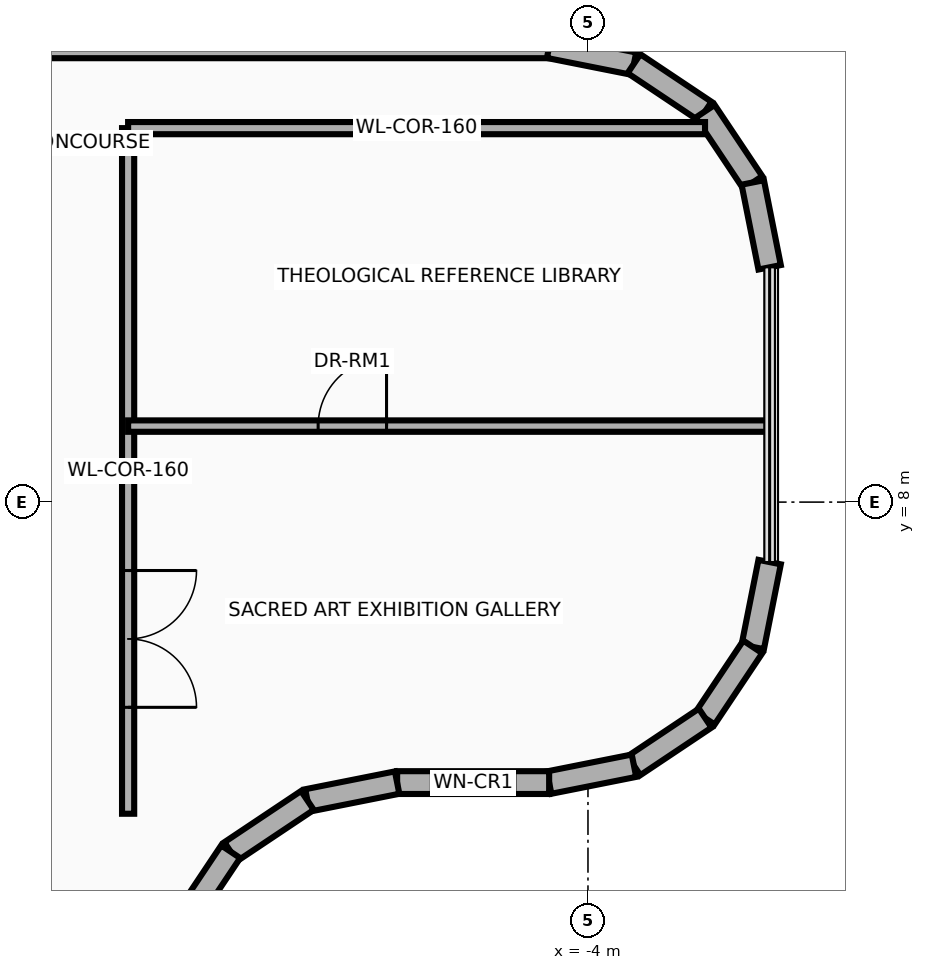
"""IFC4 building model, lengths in metres.
Left out: names, types, materials, properties, quantities, classifications, styles, units other than length and angle.
Written with IfcOpenShell. Run it as: python <this file> out.ifc"""

import sys

from ifc_helpers import new_model, si_unit, direction, frame, frame_2d, origin, place, context, subcontext, project, spatial, rectangle, extrude, element, fill, save


model = new_model("IFC4")
c1 = context("Model", 3, precision=1e-05, world=origin(), true_north=direction((0.0, 1.0)))
c2 = subcontext(c1, "Body", "Model", "MODEL_VIEW")
j1 = project(units=[si_unit("LENGTHUNIT", "METRE"), si_unit("PLANEANGLEUNIT", "RADIAN")], contexts=[c1])
p1 = place(None, origin())
s1 = spatial("IfcSite", under=j1, at=p1, CompositionType="ELEMENT")
p2 = place(p1, origin())
s2 = spatial("IfcBuilding", under=s1, at=p2, CompositionType="ELEMENT")
p3 = place(p2, frame((0.0, 0.0, 290.6)))
s3 = spatial("IfcBuildingStorey", under=s2, at=p3, CompositionType="ELEMENT", Elevation=290.6)
p4 = place(p3, frame((-26.989, 13.99, 0.0), z_axis=(0.0, 0.0, 1.0), x_axis=(1.0, 0.0, 0.0)))
e1 = element("IfcWall", 1, at=p4, inside=s3, PredefinedType="SOLIDWALL", context=c2, shape_type="SweptSolid", body=[
    extrude(rectangle(XDim=22.479, YDim=0.3, at=frame_2d((11.239, 0.0))), origin(), (0.0, 0.0, 1.0), 2.734),
])
p5 = place(p4, frame((10.79, 0.0, 0.0)))
e2 = element("IfcOpeningElement", 2, at=p5, cuts=e1, PredefinedType="OPENING", context=c2, shape_type="SweptSolid", body=[
    extrude(rectangle(XDim=1.2, YDim=2.15, at=frame_2d((0.6, 1.075))), frame((0.0, 0.165, 0.0), z_axis=(0.0, -1.0, 0.0), x_axis=(1.0, 0.0, 0.0)), (0.0, 0.0, 1.0), 0.33),
])
p6 = place(p3, frame((-4.511, 13.99, 0.0), z_axis=(0.0, 0.0, 1.0), x_axis=(0.980794657743, -0.195043173023, 0.0)))
e3 = element("IfcWall", 3, at=p6, inside=s3, PredefinedType="SOLIDWALL", context=c2, shape_type="SweptSolid", body=[
    extrude(rectangle(XDim=1.138, YDim=0.3, at=frame_2d((0.569, 0.0))), origin(), (0.0, 0.0, 1.0), 3.36),
])
p7 = place(p3, frame((-3.395, 13.768, 0.0), z_axis=(0.0, 0.0, 1.0), x_axis=(0.831449735491, -0.555599979619, 0.0)))
e4 = element("IfcWall", 4, at=p7, inside=s3, PredefinedType="SOLIDWALL", context=c2, shape_type="SweptSolid", body=[
    extrude(rectangle(XDim=1.127, YDim=0.3, at=frame_2d((0.563, 0.0))), origin(), (0.0, 0.0, 1.0), 3.36),
])
p8 = place(p3, frame((-2.458, 13.142, 0.0), z_axis=(0.0, 0.0, 1.0), x_axis=(0.555499891703, -0.831516608564, 0.0)))
e5 = element("IfcWall", 5, at=p8, inside=s3, PredefinedType="SOLIDWALL", context=c2, shape_type="SweptSolid", body=[
    extrude(rectangle(XDim=1.127, YDim=0.3, at=frame_2d((0.563, 0.0))), origin(), (0.0, 0.0, 1.0), 3.36),
])
for number, where, z_axis, x_axis in (
    (6, (-1.832, 12.205, 0.0), (0.0, 0.0, 1.0), (0.195, -0.981, 0.0)),
    (7, (-1.61, 7.211, 0.0), (0.0, 0.0, 1.0), (-0.195, -0.981, 0.0)),
):
    element("IfcWall", number, at=place(p3, frame(where, z_axis=z_axis, x_axis=x_axis)), inside=s3, PredefinedType="SOLIDWALL", context=c2, shape_type="SweptSolid", body=[
        extrude(rectangle(XDim=1.138, YDim=0.3, at=frame_2d((0.569, 0.0))), origin(), (0.0, 0.0, 1.0), 3.36),
    ])
for number, where, z_axis, x_axis in (
    (8, (-1.832, 6.095, 0.0), (0.0, 0.0, 1.0), (-0.556, -0.831, 0.0)),
    (9, (-2.458, 5.158, 0.0), (0.0, 0.0, 1.0), (-0.831, -0.556, 0.0)),
):
    element("IfcWall", number, at=place(p3, frame(where, z_axis=z_axis, x_axis=x_axis)), inside=s3, PredefinedType="SOLIDWALL", context=c2, shape_type="SweptSolid", body=[
        extrude(rectangle(XDim=1.127, YDim=0.3, at=frame_2d((0.563, 0.0))), origin(), (0.0, 0.0, 1.0), 3.36),
    ])
p9 = place(p3, frame((-3.395, 4.532, 0.0), z_axis=(0.0, 0.0, 1.0), x_axis=(-0.980794657743, -0.195043173023, 0.0)))
e10 = element("IfcWall", 10, at=p9, inside=s3, PredefinedType="SOLIDWALL", context=c2, shape_type="SweptSolid", body=[
    extrude(rectangle(XDim=1.138, YDim=0.3, at=frame_2d((0.569, 0.0))), origin(), (0.0, 0.0, 1.0), 3.36),
])
p10 = place(p3, frame((-4.511, 4.31, 0.0), z_axis=(0.0, 0.0, 1.0), x_axis=(-1.0, 0.0, 0.0)))
e11 = element("IfcWall", 11, at=p10, inside=s3, PredefinedType="SOLIDWALL", context=c2, shape_type="SweptSolid", body=[
    extrude(rectangle(XDim=2.0, YDim=0.3, at=frame_2d((1.0, 0.0))), origin(), (0.0, 0.0, 1.0), 3.36),
])
p11 = place(p10, frame((0.45, 0.0, 0.9)))
e12 = element("IfcOpeningElement", 12, at=p11, cuts=e11, PredefinedType="OPENING", context=c2, shape_type="SweptSolid", body=[
    extrude(rectangle(XDim=1.1, YDim=1.55, at=frame_2d((0.55, 0.775))), frame((0.0, 0.165, 0.0), z_axis=(0.0, -1.0, 0.0), x_axis=(1.0, 0.0, 0.0)), (0.0, 0.0, 1.0), 0.33),
])
p12 = place(p3, frame((-6.511, 4.31, 0.0), z_axis=(0.0, 0.0, 1.0), x_axis=(-0.980767511126, -0.195179632955, 0.0)))
e13 = element("IfcWall", 13, at=p12, inside=s3, PredefinedType="SOLIDWALL", context=c2, shape_type="SweptSolid", body=[
    extrude(rectangle(XDim=1.203, YDim=0.3, at=frame_2d((0.602, 0.0))), origin(), (0.0, 0.0, 1.0), 3.36),
])
p13 = place(p3, frame((-7.691, 4.075, 0.0), z_axis=(0.0, 0.0, 1.0), x_axis=(-0.83152410926, -0.555488663899, 0.0)))
e14 = element("IfcWall", 14, at=p13, inside=s3, PredefinedType="SOLIDWALL", context=c2, shape_type="SweptSolid", body=[
    extrude(rectangle(XDim=1.214, YDim=0.3, at=frame_2d((0.607, 0.0))), origin(), (0.0, 0.0, 1.0), 3.36),
])
p14 = place(p3, frame((-8.701, 3.401, 0.0), z_axis=(0.0, 0.0, 1.0), x_axis=(-0.555581539313, -0.831462057568, 0.0)))
e15 = element("IfcWall", 15, at=p14, inside=s3, PredefinedType="SOLIDWALL", context=c2, shape_type="SweptSolid", body=[
    extrude(rectangle(XDim=1.214, YDim=0.3, at=frame_2d((0.607, 0.0))), origin(), (0.0, 0.0, 1.0), 3.36),
])
p15 = place(p3, frame((-10.05, 3.9, 0.0), z_axis=(0.0, 0.0, 1.0), x_axis=(0.0, 1.0, 0.0)))
e16 = element("IfcWall", 16, at=p15, inside=s3, PredefinedType="PARTITIONING", context=c2, shape_type="SweptSolid", body=[
    extrude(rectangle(XDim=9.02, YDim=0.16, at=frame_2d((4.51, 0.0))), origin(), (0.0, 0.0, 1.0), 3.36),
])
p16 = place(p15, frame((1.4, 0.0, 0.0)))
e17 = element("IfcOpeningElement", 17, at=p16, cuts=e16, PredefinedType="OPENING", context=c2, shape_type="SweptSolid", body=[
    extrude(rectangle(XDim=1.8, YDim=2.15, at=frame_2d((0.9, 1.075))), frame((0.0, 0.095, 0.0), z_axis=(0.0, -1.0, 0.0), x_axis=(1.0, 0.0, 0.0)), (0.0, 0.0, 1.0), 0.19),
])
p17 = place(p3, frame((-10.05, 12.92, 0.0), z_axis=(0.0, 0.0, 1.0), x_axis=(1.0, 0.0, 0.0)))
e18 = element("IfcWall", 18, at=p17, inside=s3, PredefinedType="PARTITIONING", context=c2, shape_type="SweptSolid", body=[
    extrude(rectangle(XDim=7.59, YDim=0.16, at=frame_2d((3.795, 0.0))), origin(), (0.0, 0.0, 1.0), 3.36),
])
p18 = place(p3, frame((-10.05, 9.0, 0.0), z_axis=(0.0, 0.0, 1.0), x_axis=(1.0, 0.0, 0.0)))
e19 = element("IfcWall", 19, at=p18, inside=s3, PredefinedType="PARTITIONING", context=c2, shape_type="SweptSolid", body=[
    extrude(rectangle(XDim=8.44, YDim=0.15, at=frame_2d((4.22, 0.0))), origin(), (0.0, 0.0, 1.0), 3.36),
])
p19 = place(p18, frame((2.5, 0.0, 0.0)))
e20 = element("IfcOpeningElement", 20, at=p19, cuts=e19, PredefinedType="OPENING", context=c2, shape_type="SweptSolid", body=[
    extrude(rectangle(XDim=0.9, YDim=2.1, at=frame_2d((0.45, 1.05))), frame((0.0, 0.09, 0.0), z_axis=(0.0, -1.0, 0.0), x_axis=(1.0, 0.0, 0.0)), (0.0, 0.0, 1.0), 0.18),
])
p20 = place(p11, origin())
e21 = element("IfcWindow", 21, at=p20, inside=s3, PartitioningType="SINGLE_PANEL", PredefinedType="WINDOW", context=c2, shape_type="SweptSolid", body=[
    extrude(rectangle(XDim=1.1, YDim=1.55, at=frame_2d((0.55, 0.775))), frame((0.0, 0.03, 0.0), z_axis=(0.0, -1.0, 0.0), x_axis=(1.0, 0.0, 0.0)), (0.0, 0.0, 1.0), 0.06),
])
fill(e12, e21)
p21 = place(p16, frame((1.8, 0.0, 0.0), z_axis=(0.0, 0.0, 1.0), x_axis=(-1.0, 0.0, 0.0)))
e22 = element("IfcDoor", 22, at=p21, inside=s3, OperationType="DOUBLE_DOOR_SINGLE_SWING", PredefinedType="DOOR", context=c2, shape_type="SweptSolid", body=[
    extrude(rectangle(XDim=1.8, YDim=2.15, at=frame_2d((0.9, 1.075))), frame((0.0, 0.025, 0.0), z_axis=(0.0, -1.0, 0.0), x_axis=(1.0, 0.0, 0.0)), (0.0, 0.0, 1.0), 0.05),
])
fill(e17, e22)
p22 = place(p19, origin())
e23 = element("IfcDoor", 23, at=p22, inside=s3, OperationType="SINGLE_SWING_RIGHT", PredefinedType="DOOR", context=c2, shape_type="SweptSolid", body=[
    extrude(rectangle(XDim=0.9, YDim=2.1, at=frame_2d((0.45, 1.05))), frame((0.0, 0.025, 0.0), z_axis=(0.0, -1.0, 0.0), x_axis=(1.0, 0.0, 0.0)), (0.0, 0.0, 1.0), 0.05),
])
fill(e20, e23)
save(model, sys.argv[1])
